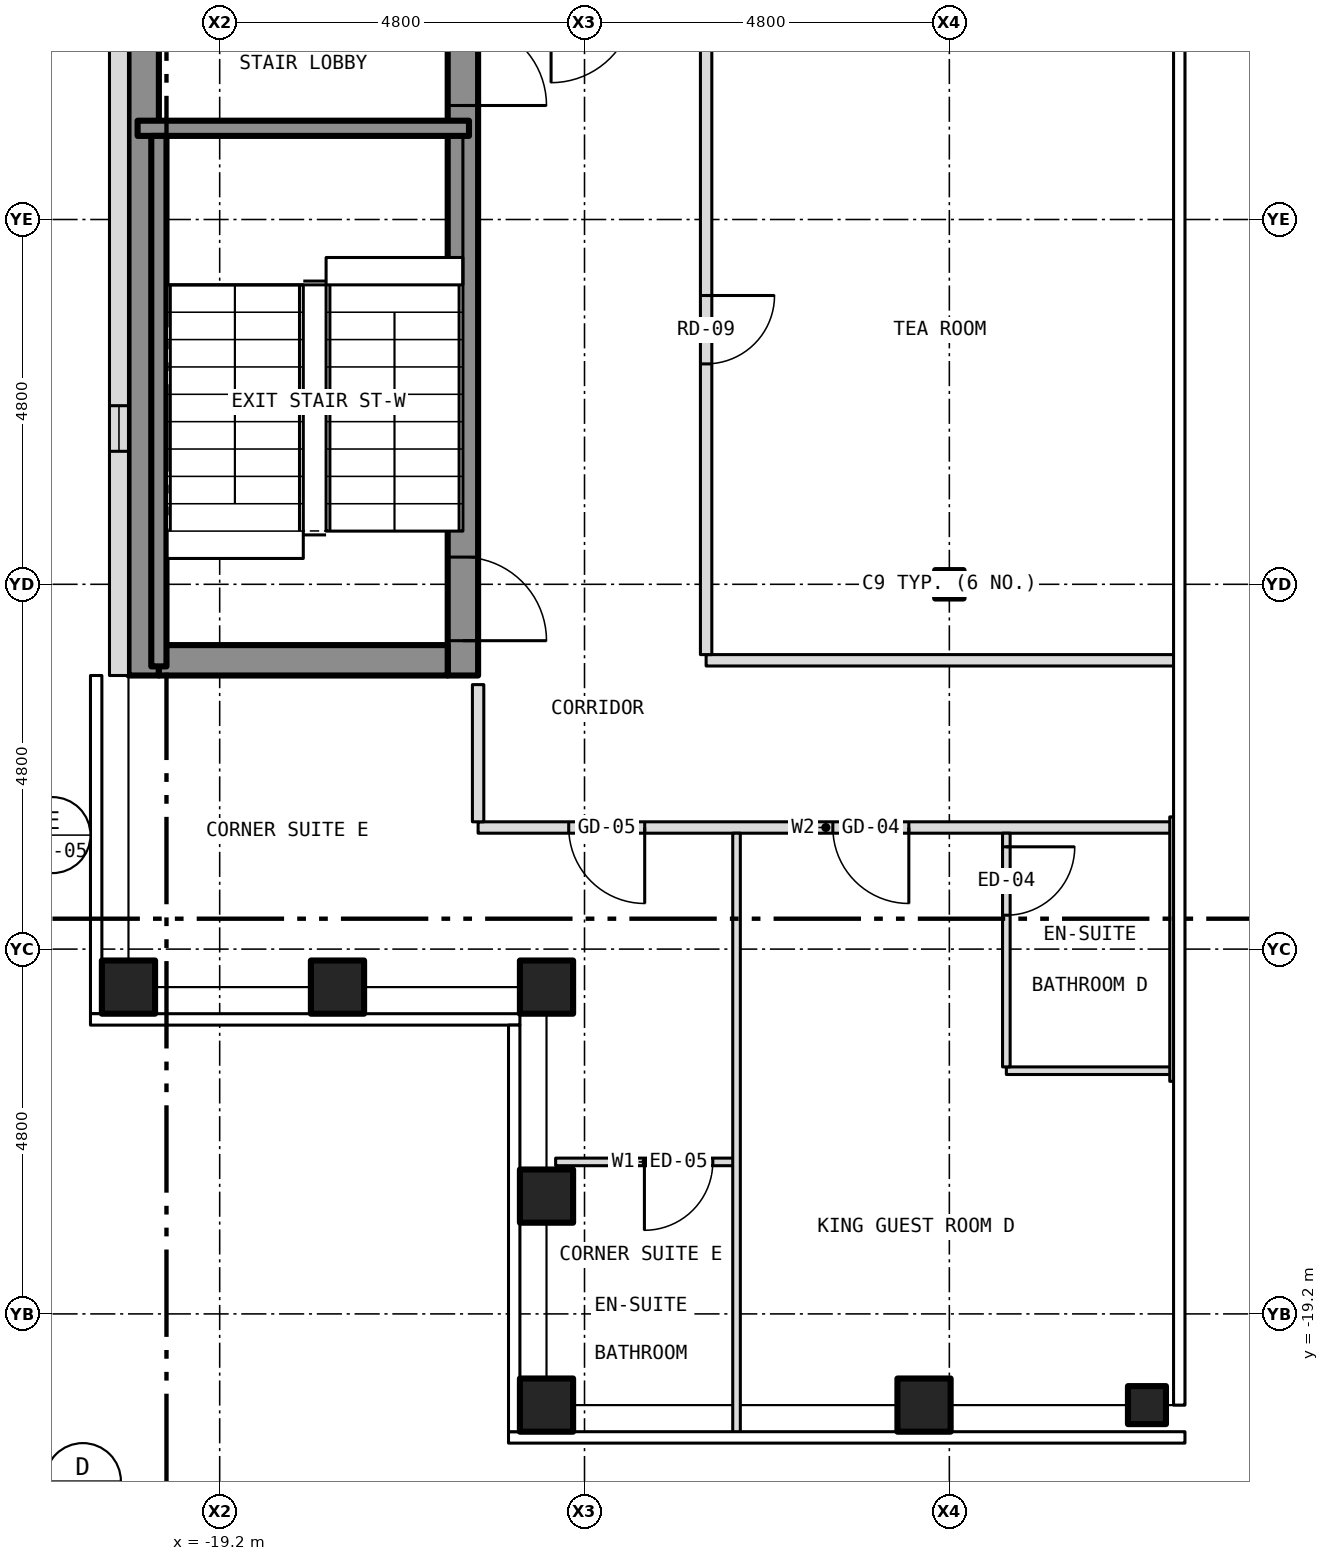
"""IFC4 building model, lengths in metres.
Left out: names, types, materials, properties, quantities, classifications, styles, units other than length and angle.
Written with IfcOpenShell. Run it as: python <this file> out.ifc"""

import sys

from ifc_helpers import new_model, si_unit, direction, frame, frame_2d, origin, origin_2d, place, context, subcontext, project, spatial, rectangle, hollow_rectangle, i_section, extrude, element, fill, save


model = new_model("IFC4")
c1 = context("Model", 3, precision=1e-05, world=origin(), true_north=direction((0.0, 1.0)))
c2 = subcontext(c1, "Body", "Model", "MODEL_VIEW")
j1 = project(units=[si_unit("LENGTHUNIT", "METRE"), si_unit("PLANEANGLEUNIT", "RADIAN")], contexts=[c1])
p1 = place(None, origin())
s1 = spatial("IfcSite", under=j1, at=p1, CompositionType="ELEMENT")
p2 = place(p1, origin())
s2 = spatial("IfcBuilding", under=s1, at=p2, CompositionType="ELEMENT")
p3 = place(p2, frame((0.0, 0.0, 226.0)))
s3 = spatial("IfcBuildingStorey", under=s2, at=p3, CompositionType="ELEMENT", Elevation=226.0)
for number, where, z_axis, x_axis in (
    (1, (-14.9, -20.4, -0.15), (0.0, 0.0, 1.0), (1.0, 0.0, 0.0)),
    (2, (-9.933, -20.4, -0.15), (0.0, 0.0, 1.0), (1.0, 0.0, 0.0)),
    (3, (-20.4, -14.9, -0.15), (0.0, 0.0, 1.0), (1.0, 0.0, 0.0)),
    (4, (-14.9, -14.9, -0.15), (0.0, 0.0, 1.0), (1.0, 0.0, 0.0)),
    (5, (-14.9, -17.65, -0.15), (0.0, 0.0, 1.0), (1.0, 0.0, 0.0)),
    (6, (-17.65, -14.9, -0.15), (0.0, 0.0, 1.0), (1.0, 0.0, 0.0)),
):
    element("IfcColumn", number, at=place(p3, frame(where, z_axis=z_axis, x_axis=x_axis)), inside=s3, PredefinedType="COLUMN", context=c2, shape_type="SweptSolid", body=[
        extrude(hollow_rectangle(XDim=0.7, YDim=0.7, WallThickness=0.04, at=origin_2d()), origin(), (0.0, 0.0, 1.0), 3.5),
    ])
p4 = place(p3, frame((-7.0, -20.4, -0.15), z_axis=(0.0, 0.0, 1.0), x_axis=(1.0, 0.0, 0.0)))
e7 = element("IfcColumn", 7, at=p4, inside=s3, PredefinedType="COLUMN", context=c2, shape_type="SweptSolid", body=[
    extrude(hollow_rectangle(XDim=0.5, YDim=0.5, WallThickness=0.03, at=origin_2d()), origin(), (0.0, 0.0, 1.0), 3.5),
])
p5 = place(p3, frame((-9.6, -9.6, -0.15), z_axis=(0.0, 0.0, 1.0), x_axis=(1.0, 0.0, 0.0)))
e8 = element("IfcColumn", 8, at=p5, inside=s3, PredefinedType="COLUMN", context=c2, shape_type="SweptSolid", body=[
    extrude(i_section(OverallWidth=0.373, OverallDepth=0.373, WebThickness=0.016, FlangeThickness=0.026, at=origin_2d()), origin(), (0.0, 0.0, 1.0), 3.5),
])
p6 = place(p3, frame((-16.0, -10.8, 0.0), z_axis=(0.0, 0.0, 1.0), x_axis=(0.0, 1.0, 0.0)))
e9 = element("IfcWall", 9, at=p6, inside=s3, PredefinedType="SHEAR", context=c2, shape_type="SweptSolid", body=[
    extrude(rectangle(XDim=21.6, YDim=0.4, at=frame_2d((10.8, 0.0))), origin(), (0.0, 0.0, 1.0), 3.25),
])
p7 = place(p6, frame((9.4, 0.0, 0.0)))
e10 = element("IfcOpeningElement", 10, at=p7, cuts=e9, PredefinedType="OPENING", context=c2, shape_type="SweptSolid", body=[
    extrude(rectangle(XDim=1.1, YDim=2.1, at=frame_2d((0.55, 1.05))), frame((0.0, 0.212, 0.0), z_axis=(0.0, -1.0, 0.0), x_axis=(1.0, 0.0, 0.0)), (0.0, 0.0, 1.0), 0.424),
])
p8 = place(p6, frame((11.5, 0.0, 0.0)))
e11 = element("IfcOpeningElement", 11, at=p8, cuts=e9, PredefinedType="OPENING", context=c2, shape_type="SweptSolid", body=[
    extrude(rectangle(XDim=1.1, YDim=2.1, at=frame_2d((0.55, 1.05))), frame((0.0, 0.212, 0.0), z_axis=(0.0, -1.0, 0.0), x_axis=(1.0, 0.0, 0.0)), (0.0, 0.0, 1.0), 0.424),
])
p9 = place(p6, frame((13.6, 0.0, 0.0)))
e12 = element("IfcOpeningElement", 12, at=p9, cuts=e9, PredefinedType="OPENING", context=c2, shape_type="SweptSolid", body=[
    extrude(rectangle(XDim=1.1, YDim=2.1, at=frame_2d((0.55, 1.05))), frame((0.0, 0.212, 0.0), z_axis=(0.0, -1.0, 0.0), x_axis=(1.0, 0.0, 0.0)), (0.0, 0.0, 1.0), 0.424),
])
p10 = place(p6, frame((15.7, 0.0, 0.0)))
e13 = element("IfcOpeningElement", 13, at=p10, cuts=e9, PredefinedType="OPENING", context=c2, shape_type="SweptSolid", body=[
    extrude(rectangle(XDim=1.1, YDim=2.1, at=frame_2d((0.55, 1.05))), frame((0.0, 0.212, 0.0), z_axis=(0.0, -1.0, 0.0), x_axis=(1.0, 0.0, 0.0)), (0.0, 0.0, 1.0), 0.424),
])
p11 = place(p6, frame((17.8, 0.0, 0.0)))
e14 = element("IfcOpeningElement", 14, at=p11, cuts=e9, PredefinedType="OPENING", context=c2, shape_type="SweptSolid", body=[
    extrude(rectangle(XDim=1.1, YDim=2.1, at=frame_2d((0.55, 1.05))), frame((0.0, 0.212, 0.0), z_axis=(0.0, -1.0, 0.0), x_axis=(1.0, 0.0, 0.0)), (0.0, 0.0, 1.0), 0.424),
])
p12 = place(p6, frame((0.458, 0.0, 0.0)))
e15 = element("IfcOpeningElement", 15, at=p12, cuts=e9, PredefinedType="OPENING", context=c2, shape_type="SweptSolid", body=[
    extrude(rectangle(XDim=1.1, YDim=2.1, at=frame_2d((0.55, 1.05))), frame((0.0, 0.212, 0.0), z_axis=(0.0, -1.0, 0.0), x_axis=(1.0, 0.0, 0.0)), (0.0, 0.0, 1.0), 0.424),
])
p13 = place(p6, frame((7.5, 0.0, 0.0)))
e16 = element("IfcOpeningElement", 16, at=p13, cuts=e9, PredefinedType="OPENING", context=c2, shape_type="SweptSolid", body=[
    extrude(rectangle(XDim=1.1, YDim=2.1, at=frame_2d((0.55, 1.05))), frame((0.0, 0.212, 0.0), z_axis=(0.0, -1.0, 0.0), x_axis=(1.0, 0.0, 0.0)), (0.0, 0.0, 1.0), 0.424),
])
p14 = place(p6, frame((20.0, 0.0, 0.0)))
e17 = element("IfcOpeningElement", 17, at=p14, cuts=e9, PredefinedType="OPENING", context=c2, shape_type="SweptSolid", body=[
    extrude(rectangle(XDim=0.9, YDim=2.1, at=frame_2d((0.45, 1.05))), frame((0.0, 0.212, 0.0), z_axis=(0.0, -1.0, 0.0), x_axis=(1.0, 0.0, 0.0)), (0.0, 0.0, 1.0), 0.424),
])
p15 = place(p3, frame((-20.2, -10.8, 0.0), z_axis=(0.0, 0.0, 1.0), x_axis=(0.0, 1.0, 0.0)))
e18 = element("IfcWall", 18, at=p15, inside=s3, PredefinedType="SHEAR", context=c2, shape_type="SweptSolid", body=[
    extrude(rectangle(XDim=21.6, YDim=0.4, at=frame_2d((10.8, 0.0))), origin(), (0.0, 0.0, 1.0), 3.25),
])
p16 = place(p3, frame((-20.0, -10.6, 0.0), z_axis=(0.0, 0.0, 1.0), x_axis=(1.0, 0.0, 0.0)))
e19 = element("IfcWall", 19, at=p16, inside=s3, PredefinedType="SHEAR", context=c2, shape_type="SweptSolid", body=[
    extrude(rectangle(XDim=3.8, YDim=0.4, at=frame_2d((1.9, 0.0))), origin(), (0.0, 0.0, 1.0), 3.25),
])
p17 = place(p3, frame((-20.525, 10.8, 0.0), z_axis=(0.0, 0.0, 1.0), x_axis=(0.0, -1.0, 0.0)))
e20 = element("IfcWall", 20, at=p17, inside=s3, PredefinedType="SOLIDWALL", context=c2, shape_type="SweptSolid", body=[
    extrude(rectangle(XDim=21.6, YDim=0.25, at=frame_2d((10.8, 0.0))), origin(), (0.0, 0.0, 1.0), 3.5),
])
p18 = place(p17, frame((18.05, 0.0, 1.0)))
e21 = element("IfcOpeningElement", 21, at=p18, cuts=e20, PredefinedType="OPENING", context=c2, shape_type="SweptSolid", body=[
    extrude(rectangle(XDim=0.6, YDim=1.5, at=frame_2d((0.3, 0.75))), frame((0.0, 0.137, 0.0), z_axis=(0.0, -1.0, 0.0), x_axis=(1.0, 0.0, 0.0)), (0.0, 0.0, 1.0), 0.274),
])
p19 = place(p3, frame((-14.78, -17.2, 0.0), z_axis=(0.0, 0.0, 1.0), x_axis=(1.0, 0.0, 0.0)))
e22 = element("IfcWall", 22, at=p19, inside=s3, PredefinedType="PARTITIONING", context=c2, shape_type="SweptSolid", body=[
    extrude(rectangle(XDim=2.38, YDim=0.1, at=frame_2d((1.19, 0.0))), origin(), (0.0, 0.0, 1.0), 3.35),
])
p20 = place(p19, frame((1.168, 0.0, 0.0)))
e23 = element("IfcOpeningElement", 23, at=p20, cuts=e22, PredefinedType="OPENING", context=c2, shape_type="SweptSolid", body=[
    extrude(rectangle(XDim=0.9, YDim=2.1, at=frame_2d((0.45, 1.05))), frame((0.0, 0.062, 0.0), z_axis=(0.0, -1.0, 0.0), x_axis=(1.0, 0.0, 0.0)), (0.0, 0.0, 1.0), 0.124),
])
p21 = place(p3, frame((-8.85, -16.0, 0.0), z_axis=(0.0, 0.0, 1.0), x_axis=(1.0, 0.0, 0.0)))
e24 = element("IfcWall", 24, at=p21, inside=s3, PredefinedType="PARTITIONING", context=c2, shape_type="SweptSolid", body=[
    extrude(rectangle(XDim=2.2, YDim=0.1, at=frame_2d((1.1, 0.0))), origin(), (0.0, 0.0, 1.0), 3.35),
])
p22 = place(p3, frame((-15.8, -12.8, 0.0), z_axis=(0.0, 0.0, 1.0), x_axis=(1.0, 0.0, 0.0)))
e25 = element("IfcWall", 25, at=p22, inside=s3, PredefinedType="PARTITIONING", context=c2, shape_type="SweptSolid", body=[
    extrude(rectangle(XDim=9.15, YDim=0.15, at=frame_2d((4.575, 0.0))), origin(), (0.0, 0.0, 1.0), 3.35),
])
p23 = place(p22, frame((4.667, 0.0, 0.0)))
e26 = element("IfcOpeningElement", 26, at=p23, cuts=e25, PredefinedType="OPENING", context=c2, shape_type="SweptSolid", body=[
    extrude(rectangle(XDim=1.0, YDim=2.1, at=frame_2d((0.5, 1.05))), frame((0.0, 0.087, 0.0), z_axis=(0.0, -1.0, 0.0), x_axis=(1.0, 0.0, 0.0)), (0.0, 0.0, 1.0), 0.174),
])
p24 = place(p22, frame((1.192, 0.0, 0.0)))
e27 = element("IfcOpeningElement", 27, at=p24, cuts=e25, PredefinedType="OPENING", context=c2, shape_type="SweptSolid", body=[
    extrude(rectangle(XDim=1.0, YDim=2.1, at=frame_2d((0.5, 1.05))), frame((0.0, 0.087, 0.0), z_axis=(0.0, -1.0, 0.0), x_axis=(1.0, 0.0, 0.0)), (0.0, 0.0, 1.0), 0.174),
])
p25 = place(p3, frame((-12.8, -10.6, 0.0), z_axis=(0.0, 0.0, 1.0), x_axis=(1.0, 0.0, 0.0)))
e28 = element("IfcWall", 28, at=p25, inside=s3, PredefinedType="PARTITIONING", context=c2, shape_type="SweptSolid", body=[
    extrude(rectangle(XDim=6.18, YDim=0.15, at=frame_2d((3.09, 0.0))), origin(), (0.0, 0.0, 1.0), 3.35),
])
p26 = place(p3, frame((-20.28, -3.6, 0.0), z_axis=(0.0, 0.0, 1.0), x_axis=(1.0, 0.0, 0.0)))
e29 = element("IfcWall", 29, at=p26, inside=s3, PredefinedType="SHEAR", context=c2, shape_type="SweptSolid", body=[
    extrude(rectangle(XDim=4.36, YDim=0.2, at=frame_2d((2.18, 0.0))), origin(), (0.0, 0.0, 1.0), 3.25),
])
p27 = place(p3, frame((-20.0, -10.68, 0.0), z_axis=(0.0, 0.0, 1.0), x_axis=(0.0, 1.0, 0.0)))
e30 = element("IfcWall", 30, at=p27, inside=s3, PredefinedType="SHEAR", context=c2, shape_type="SweptSolid", body=[
    extrude(rectangle(XDim=6.98, YDim=0.2, at=frame_2d((3.49, 0.0))), origin(), (0.0, 0.0, 1.0), 3.25),
])
p28 = place(p3, frame((-15.8, -12.725, 0.0), z_axis=(0.0, 0.0, 1.0), x_axis=(0.0, 1.0, 0.0)))
e31 = element("IfcWall", 31, at=p28, inside=s3, PredefinedType="PARTITIONING", context=c2, shape_type="SweptSolid", body=[
    extrude(rectangle(XDim=1.805, YDim=0.15, at=frame_2d((0.903, 0.0))), origin(), (0.0, 0.0, 1.0), 3.35),
])
p29 = place(p3, frame((-12.8, -10.525, 0.0), z_axis=(0.0, 0.0, 1.0), x_axis=(0.0, 1.0, 0.0)))
e32 = element("IfcWall", 32, at=p29, inside=s3, PredefinedType="PARTITIONING", context=c2, shape_type="SweptSolid", body=[
    extrude(rectangle(XDim=8.525, YDim=0.15, at=frame_2d((4.262, 0.0))), origin(), (0.0, 0.0, 1.0), 3.35),
])
p30 = place(p29, frame((3.825, 0.0, 0.0)))
e33 = element("IfcOpeningElement", 33, at=p30, cuts=e32, PredefinedType="OPENING", context=c2, shape_type="SweptSolid", body=[
    extrude(rectangle(XDim=0.9, YDim=2.1, at=frame_2d((0.45, 1.05))), frame((0.0, 0.087, 0.0), z_axis=(0.0, -1.0, 0.0), x_axis=(1.0, 0.0, 0.0)), (0.0, 0.0, 1.0), 0.174),
])
p31 = place(p3, frame((-12.4, -20.78, 0.0), z_axis=(0.0, 0.0, 1.0), x_axis=(0.0, 1.0, 0.0)))
e34 = element("IfcWall", 34, at=p31, inside=s3, PredefinedType="PARTITIONING", context=c2, shape_type="SweptSolid", body=[
    extrude(rectangle(XDim=7.905, YDim=0.1, at=frame_2d((3.953, 0.0))), origin(), (0.0, 0.0, 1.0), 3.35),
])
p32 = place(p3, frame((-8.85, -15.95, 0.0), z_axis=(0.0, 0.0, 1.0), x_axis=(0.0, 1.0, 0.0)))
e35 = element("IfcWall", 35, at=p32, inside=s3, PredefinedType="PARTITIONING", context=c2, shape_type="SweptSolid", body=[
    extrude(rectangle(XDim=3.075, YDim=0.1, at=frame_2d((1.538, 0.0))), origin(), (0.0, 0.0, 1.0), 3.35),
])
p33 = place(p32, frame((1.996, 0.0, 0.0)))
e36 = element("IfcOpeningElement", 36, at=p33, cuts=e35, PredefinedType="OPENING", context=c2, shape_type="SweptSolid", body=[
    extrude(rectangle(XDim=0.9, YDim=2.1, at=frame_2d((0.45, 1.05))), frame((0.0, 0.062, 0.0), z_axis=(0.0, -1.0, 0.0), x_axis=(1.0, 0.0, 0.0)), (0.0, 0.0, 1.0), 0.124),
])
p34 = place(p3, frame((-6.65, -16.14, 0.0), z_axis=(0.0, 0.0, 1.0), x_axis=(0.0, 1.0, 0.0)))
e37 = element("IfcWall", 37, at=p34, inside=s3, PredefinedType="PARTITIONING", context=c2, shape_type="SweptSolid", body=[
    extrude(rectangle(XDim=3.48, YDim=0.1, at=frame_2d((1.74, 0.0))), origin(), (0.0, 0.0, 1.0), 3.35),
])
p35 = place(p18, origin())
e38 = element("IfcWindow", 38, at=p35, inside=s3, PartitioningType="SINGLE_PANEL", PredefinedType="WINDOW", context=c2, shape_type="SweptSolid", body=[
    extrude(rectangle(XDim=0.6, YDim=1.5, at=frame_2d((0.3, 0.75))), frame((0.0, -0.035, 0.0), z_axis=(0.0, -1.0, 0.0), x_axis=(1.0, 0.0, 0.0)), (0.0, 0.0, 1.0), 0.06),
])
fill(e21, e38)
p36 = place(p12, origin())
e39 = element("IfcDoor", 39, at=p36, inside=s3, OperationType="SINGLE_SWING_LEFT", PredefinedType="DOOR", context=c2, shape_type="SweptSolid", body=[
    extrude(rectangle(XDim=1.1, YDim=2.1, at=frame_2d((0.55, 1.05))), frame((0.0, 0.025, 0.0), z_axis=(0.0, -1.0, 0.0), x_axis=(1.0, 0.0, 0.0)), (0.0, 0.0, 1.0), 0.05),
])
fill(e15, e39)
p37 = place(p13, origin())
e40 = element("IfcDoor", 40, at=p37, inside=s3, OperationType="SINGLE_SWING_LEFT", PredefinedType="DOOR", context=c2, shape_type="SweptSolid", body=[
    extrude(rectangle(XDim=1.1, YDim=2.1, at=frame_2d((0.55, 1.05))), frame((0.0, 0.025, 0.0), z_axis=(0.0, -1.0, 0.0), x_axis=(1.0, 0.0, 0.0)), (0.0, 0.0, 1.0), 0.05),
])
fill(e16, e40)
p38 = place(p23, origin())
e41 = element("IfcDoor", 41, at=p38, inside=s3, OperationType="SINGLE_SWING_RIGHT", PredefinedType="DOOR", context=c2, shape_type="SweptSolid", body=[
    extrude(rectangle(XDim=1.0, YDim=2.1, at=frame_2d((0.5, 1.05))), frame((0.0, 0.025, 0.0), z_axis=(0.0, -1.0, 0.0), x_axis=(1.0, 0.0, 0.0)), (0.0, 0.0, 1.0), 0.05),
])
fill(e26, e41)
p39 = place(p33, origin())
e42 = element("IfcDoor", 42, at=p39, inside=s3, OperationType="SINGLE_SWING_RIGHT", PredefinedType="DOOR", context=c2, shape_type="SweptSolid", body=[
    extrude(rectangle(XDim=0.9, YDim=2.1, at=frame_2d((0.45, 1.05))), frame((0.0, 0.025, 0.0), z_axis=(0.0, -1.0, 0.0), x_axis=(1.0, 0.0, 0.0)), (0.0, 0.0, 1.0), 0.05),
])
fill(e36, e42)
p40 = place(p20, origin())
e43 = element("IfcDoor", 43, at=p40, inside=s3, OperationType="SINGLE_SWING_LEFT", PredefinedType="DOOR", context=c2, shape_type="SweptSolid", body=[
    extrude(rectangle(XDim=0.9, YDim=2.1, at=frame_2d((0.45, 1.05))), frame((0.0, 0.025, 0.0), z_axis=(0.0, -1.0, 0.0), x_axis=(1.0, 0.0, 0.0)), (0.0, 0.0, 1.0), 0.05),
])
fill(e23, e43)
p41 = place(p24, origin())
e44 = element("IfcDoor", 44, at=p41, inside=s3, OperationType="SINGLE_SWING_RIGHT", PredefinedType="DOOR", context=c2, shape_type="SweptSolid", body=[
    extrude(rectangle(XDim=1.0, YDim=2.1, at=frame_2d((0.5, 1.05))), frame((0.0, 0.025, 0.0), z_axis=(0.0, -1.0, 0.0), x_axis=(1.0, 0.0, 0.0)), (0.0, 0.0, 1.0), 0.05),
])
fill(e27, e44)
p42 = place(p30, origin())
e45 = element("IfcDoor", 45, at=p42, inside=s3, OperationType="SINGLE_SWING_RIGHT", PredefinedType="DOOR", context=c2, shape_type="SweptSolid", body=[
    extrude(rectangle(XDim=0.9, YDim=2.1, at=frame_2d((0.45, 1.05))), frame((0.0, 0.025, 0.0), z_axis=(0.0, -1.0, 0.0), x_axis=(1.0, 0.0, 0.0)), (0.0, 0.0, 1.0), 0.05),
])
fill(e33, e45)
save(model, sys.argv[1])
